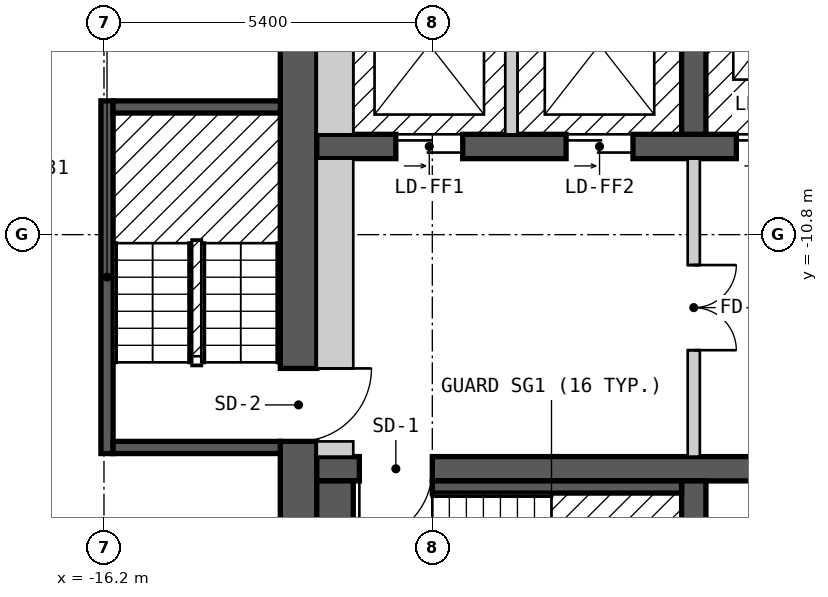
"""IFC4 building model, lengths in metres.
Left out: names, types, materials, properties, quantities, classifications, styles, units other than length and angle.
Written with IfcOpenShell. Run it as: python <this file> out.ifc"""

import sys

from ifc_helpers import new_model, si_unit, direction, frame, frame_2d, origin, origin_2d, place, context, subcontext, project, spatial, polyline, rectangle, outline, extrude, element, fill, save


model = new_model("IFC4")
c1 = context("Model", 3, precision=1e-05, world=origin(), true_north=direction((0.0, 1.0)))
c2 = subcontext(c1, "Body", "Model", "MODEL_VIEW")
j1 = project(units=[si_unit("LENGTHUNIT", "METRE"), si_unit("PLANEANGLEUNIT", "RADIAN")], contexts=[c1])
p1 = place(None, origin())
s1 = spatial("IfcSite", under=j1, at=p1, CompositionType="ELEMENT")
p2 = place(p1, origin())
s2 = spatial("IfcBuilding", under=s1, at=p2, CompositionType="ELEMENT")
p3 = place(p2, frame((0.0, 0.0, 187.2)))
s3 = spatial("IfcBuildingStorey", under=s2, at=p3, CompositionType="ELEMENT", Elevation=187.2)
p4 = place(p3, frame((-17.53, -15.736, 0.0), z_axis=(0.0, 0.0, 1.0), x_axis=(0.5, -0.866025403784, 0.0)))
e1 = element("IfcColumn", 1, at=p4, inside=s3, PredefinedType="COLUMN", context=c2, shape_type="SweptSolid", body=[
    extrude(rectangle(XDim=0.8, YDim=0.8, at=origin_2d()), origin(), (0.0, 0.0, 1.0), 3.0),
])
p5 = place(p3, frame((-13.0, -18.4, 0.0), z_axis=(0.0, 0.0, 1.0), x_axis=(0.0, 1.0, 0.0)))
e2 = element("IfcWall", 2, at=p5, inside=s3, PredefinedType="SHEAR", context=c2, shape_type="SweptSolid", body=[
    extrude(rectangle(XDim=12.8, YDim=0.6, at=frame_2d((6.4, 0.0))), origin(), (0.0, 0.0, 1.0), 2.7),
])
p6 = place(p5, frame((4.2, 0.0, 0.0)))
e3 = element("IfcOpeningElement", 3, at=p6, cuts=e2, PredefinedType="OPENING", context=c2, shape_type="SweptSolid", body=[
    extrude(rectangle(XDim=1.2, YDim=2.1, at=frame_2d((0.6, 1.05))), frame((0.0, 0.31, 0.0), z_axis=(0.0, -1.0, 0.0), x_axis=(1.0, 0.0, 0.0)), (0.0, 0.0, 1.0), 0.62),
])
p7 = place(p3, frame((-12.7, -14.65, 0.0), z_axis=(0.0, 0.0, 1.0), x_axis=(1.0, 0.0, 0.0)))
e4 = element("IfcWall", 4, at=p7, inside=s3, PredefinedType="SHEAR", context=c2, shape_type="SweptSolid", body=[
    extrude(rectangle(XDim=25.4, YDim=0.4, at=frame_2d((12.7, 0.0))), origin(), (0.0, 0.0, 1.0), 2.7),
])
p8 = place(p7, frame((1.9, 0.0, 0.0), z_axis=(0.0, 0.0, 1.0), x_axis=(-1.0, 0.0, 0.0)))
e5 = element("IfcOpeningElement", 5, at=p8, cuts=e4, PredefinedType="OPENING", context=c2, shape_type="SweptSolid", body=[
    extrude(rectangle(XDim=1.2, YDim=2.1, at=frame_2d((0.6, 1.05))), frame((0.0, 0.21, 0.0), z_axis=(0.0, -1.0, 0.0), x_axis=(1.0, 0.0, 0.0)), (0.0, 0.0, 1.0), 0.42),
])
p9 = place(p7, frame((24.75, 0.0, 0.0), z_axis=(0.0, 0.0, 1.0), x_axis=(-1.0, 0.0, 0.0)))
e6 = element("IfcOpeningElement", 6, at=p9, cuts=e4, PredefinedType="OPENING", context=c2, shape_type="SweptSolid", body=[
    extrude(rectangle(XDim=1.2, YDim=2.1, at=frame_2d((0.6, 1.05))), frame((0.0, 0.21, 0.0), z_axis=(0.0, -1.0, 0.0), x_axis=(1.0, 0.0, 0.0)), (0.0, 0.0, 1.0), 0.42),
])
p10 = place(p7, frame((8.6, 0.0, 0.0), z_axis=(0.0, 0.0, 1.0), x_axis=(-1.0, 0.0, 0.0)))
e7 = element("IfcOpeningElement", 7, at=p10, cuts=e4, PredefinedType="OPENING", context=c2, shape_type="SweptSolid", body=[
    extrude(rectangle(XDim=1.0, YDim=2.1, at=frame_2d((0.5, 1.05))), frame((0.0, 0.21, 0.0), z_axis=(0.0, -1.0, 0.0), x_axis=(1.0, 0.0, 0.0)), (0.0, 0.0, 1.0), 0.42),
])
p11 = place(p7, frame((11.35, 0.0, 0.0), z_axis=(0.0, 0.0, 1.0), x_axis=(-1.0, 0.0, 0.0)))
e8 = element("IfcOpeningElement", 8, at=p11, cuts=e4, PredefinedType="OPENING", context=c2, shape_type="SweptSolid", body=[
    extrude(rectangle(XDim=0.9, YDim=2.1, at=frame_2d((0.45, 1.05))), frame((0.0, 0.21, 0.0), z_axis=(0.0, -1.0, 0.0), x_axis=(1.0, 0.0, 0.0)), (0.0, 0.0, 1.0), 0.42),
])
p12 = place(p7, frame((14.15, 0.0, 0.0), z_axis=(0.0, 0.0, 1.0), x_axis=(-1.0, 0.0, 0.0)))
e9 = element("IfcOpeningElement", 9, at=p12, cuts=e4, PredefinedType="OPENING", context=c2, shape_type="SweptSolid", body=[
    extrude(rectangle(XDim=1.0, YDim=2.1, at=frame_2d((0.5, 1.05))), frame((0.0, 0.21, 0.0), z_axis=(0.0, -1.0, 0.0), x_axis=(1.0, 0.0, 0.0)), (0.0, 0.0, 1.0), 0.42),
])
p13 = place(p7, frame((17.75, 0.0, 0.0), z_axis=(0.0, 0.0, 1.0), x_axis=(-1.0, 0.0, 0.0)))
e10 = element("IfcOpeningElement", 10, at=p13, cuts=e4, PredefinedType="OPENING", context=c2, shape_type="SweptSolid", body=[
    extrude(rectangle(XDim=1.0, YDim=2.1, at=frame_2d((0.5, 1.05))), frame((0.0, 0.21, 0.0), z_axis=(0.0, -1.0, 0.0), x_axis=(1.0, 0.0, 0.0)), (0.0, 0.0, 1.0), 0.42),
])
p14 = place(p3, frame((-12.7, -9.35, 0.0), z_axis=(0.0, 0.0, 1.0), x_axis=(1.0, 0.0, 0.0)))
e11 = element("IfcWall", 11, at=p14, inside=s3, PredefinedType="SHEAR", context=c2, shape_type="SweptSolid", body=[
    extrude(rectangle(XDim=22.9, YDim=0.4, at=frame_2d((11.45, 0.0))), origin(), (0.0, 0.0, 1.0), 2.7),
])
p15 = place(p14, frame((1.3, 0.0, 0.0)))
e12 = element("IfcOpeningElement", 12, at=p15, cuts=e11, PredefinedType="OPENING", context=c2, shape_type="SweptSolid", body=[
    extrude(rectangle(XDim=1.1, YDim=2.1, at=frame_2d((0.55, 1.05))), frame((0.0, 0.21, 0.0), z_axis=(0.0, -1.0, 0.0), x_axis=(1.0, 0.0, 0.0)), (0.0, 0.0, 1.0), 0.42),
])
p16 = place(p14, frame((4.1, 0.0, 0.0)))
e13 = element("IfcOpeningElement", 13, at=p16, cuts=e11, PredefinedType="OPENING", context=c2, shape_type="SweptSolid", body=[
    extrude(rectangle(XDim=1.1, YDim=2.1, at=frame_2d((0.55, 1.05))), frame((0.0, 0.21, 0.0), z_axis=(0.0, -1.0, 0.0), x_axis=(1.0, 0.0, 0.0)), (0.0, 0.0, 1.0), 0.42),
])
p17 = place(p14, frame((6.9, 0.0, 0.0)))
e14 = element("IfcOpeningElement", 14, at=p17, cuts=e11, PredefinedType="OPENING", context=c2, shape_type="SweptSolid", body=[
    extrude(rectangle(XDim=1.1, YDim=2.1, at=frame_2d((0.55, 1.05))), frame((0.0, 0.21, 0.0), z_axis=(0.0, -1.0, 0.0), x_axis=(1.0, 0.0, 0.0)), (0.0, 0.0, 1.0), 0.42),
])
p18 = place(p14, frame((9.2, 0.0, 0.0)))
e15 = element("IfcOpeningElement", 15, at=p18, cuts=e11, PredefinedType="OPENING", context=c2, shape_type="SweptSolid", body=[
    extrude(rectangle(XDim=1.1, YDim=2.1, at=frame_2d((0.55, 1.05))), frame((0.0, 0.21, 0.0), z_axis=(0.0, -1.0, 0.0), x_axis=(1.0, 0.0, 0.0)), (0.0, 0.0, 1.0), 0.42),
])
p19 = place(p14, frame((11.5, 0.0, 0.0)))
e16 = element("IfcOpeningElement", 16, at=p19, cuts=e11, PredefinedType="OPENING", context=c2, shape_type="SweptSolid", body=[
    extrude(rectangle(XDim=1.1, YDim=2.1, at=frame_2d((0.55, 1.05))), frame((0.0, 0.21, 0.0), z_axis=(0.0, -1.0, 0.0), x_axis=(1.0, 0.0, 0.0)), (0.0, 0.0, 1.0), 0.42),
])
p20 = place(p14, frame((13.8, 0.0, 0.0)))
e17 = element("IfcOpeningElement", 17, at=p20, cuts=e11, PredefinedType="OPENING", context=c2, shape_type="SweptSolid", body=[
    extrude(rectangle(XDim=1.1, YDim=2.1, at=frame_2d((0.55, 1.05))), frame((0.0, 0.21, 0.0), z_axis=(0.0, -1.0, 0.0), x_axis=(1.0, 0.0, 0.0)), (0.0, 0.0, 1.0), 0.42),
])
p21 = place(p14, frame((16.1, 0.0, 0.0)))
e18 = element("IfcOpeningElement", 18, at=p21, cuts=e11, PredefinedType="OPENING", context=c2, shape_type="SweptSolid", body=[
    extrude(rectangle(XDim=1.1, YDim=2.1, at=frame_2d((0.55, 1.05))), frame((0.0, 0.21, 0.0), z_axis=(0.0, -1.0, 0.0), x_axis=(1.0, 0.0, 0.0)), (0.0, 0.0, 1.0), 0.42),
])
p22 = place(p14, frame((18.4, 0.0, 0.0)))
e19 = element("IfcOpeningElement", 19, at=p22, cuts=e11, PredefinedType="OPENING", context=c2, shape_type="SweptSolid", body=[
    extrude(rectangle(XDim=1.1, YDim=2.1, at=frame_2d((0.55, 1.05))), frame((0.0, 0.21, 0.0), z_axis=(0.0, -1.0, 0.0), x_axis=(1.0, 0.0, 0.0)), (0.0, 0.0, 1.0), 0.42),
])
p23 = place(p14, frame((20.8, 0.0, 0.0)))
e20 = element("IfcOpeningElement", 20, at=p23, cuts=e11, PredefinedType="OPENING", context=c2, shape_type="SweptSolid", body=[
    extrude(rectangle(XDim=1.1, YDim=2.1, at=frame_2d((0.55, 1.05))), frame((0.0, 0.21, 0.0), z_axis=(0.0, -1.0, 0.0), x_axis=(1.0, 0.0, 0.0)), (0.0, 0.0, 1.0), 0.42),
])
for number, where, z_axis, x_axis in (
    (21, (-6.5, -18.4, 0.0), (0.0, 0.0, 1.0), (0.0, 1.0, 0.0)),
    (22, (-6.5, -9.15, 0.0), (0.0, 0.0, 1.0), (0.0, 1.0, 0.0)),
):
    element("IfcWall", number, at=place(p3, frame(where, z_axis=z_axis, x_axis=x_axis)), inside=s3, PredefinedType="SHEAR", context=c2, shape_type="SweptSolid", body=[
        extrude(rectangle(XDim=3.55, YDim=0.4, at=frame_2d((1.775, 0.0))), origin(), (0.0, 0.0, 1.0), 2.7),
    ])
p24 = place(p3, frame((-26.024, -3.025, 0.0), z_axis=(0.0, 0.0, 1.0), x_axis=(0.500018670445, -0.86601462413, 0.0)))
e23 = element("IfcWall", 23, at=p24, inside=s3, PredefinedType="SOLIDWALL", context=c2, shape_type="SweptSolid", body=[
    extrude(outline(polyline([(0.0, -0.15), (20.785, -0.15), (20.705, 0.15), (0.08, 0.15), (0.0, -0.15)])), origin(), (0.0, 0.0, 1.0), 2.7),
])
p25 = place(p24, frame((2.346, 0.0, 0.15)))
e24 = element("IfcOpeningElement", 24, at=p25, cuts=e23, PredefinedType="OPENING", context=c2, shape_type="SweptSolid", body=[
    extrude(rectangle(XDim=1.5, YDim=2.1, at=frame_2d((0.75, 1.05))), frame((0.0, 0.16, 0.0), z_axis=(0.0, -1.0, 0.0), x_axis=(1.0, 0.0, 0.0)), (0.0, 0.0, 1.0), 0.32),
])
p26 = place(p24, frame((7.21, 0.0, 0.15)))
e25 = element("IfcOpeningElement", 25, at=p26, cuts=e23, PredefinedType="OPENING", context=c2, shape_type="SweptSolid", body=[
    extrude(rectangle(XDim=1.5, YDim=2.1, at=frame_2d((0.75, 1.05))), frame((0.0, 0.16, 0.0), z_axis=(0.0, -1.0, 0.0), x_axis=(1.0, 0.0, 0.0)), (0.0, 0.0, 1.0), 0.32),
])
p27 = place(p24, frame((12.073, 0.0, 0.15)))
e26 = element("IfcOpeningElement", 26, at=p27, cuts=e23, PredefinedType="OPENING", context=c2, shape_type="SweptSolid", body=[
    extrude(rectangle(XDim=1.5, YDim=2.1, at=frame_2d((0.75, 1.05))), frame((0.0, 0.16, 0.0), z_axis=(0.0, -1.0, 0.0), x_axis=(1.0, 0.0, 0.0)), (0.0, 0.0, 1.0), 0.32),
])
p28 = place(p24, frame((16.938, 0.0, 0.15)))
e27 = element("IfcOpeningElement", 27, at=p28, cuts=e23, PredefinedType="OPENING", context=c2, shape_type="SweptSolid", body=[
    extrude(rectangle(XDim=1.5, YDim=2.1, at=frame_2d((0.75, 1.05))), frame((0.0, 0.16, 0.0), z_axis=(0.0, -1.0, 0.0), x_axis=(1.0, 0.0, 0.0)), (0.0, 0.0, 1.0), 0.32),
])
p29 = place(p3, frame((-23.13, -7.737, 0.0), z_axis=(0.0, 0.0, 1.0), x_axis=(0.86598451299, 0.500070818246, 0.0)))
e28 = element("IfcWall", 28, at=p29, inside=s3, PredefinedType="PARTITIONING", context=c2, shape_type="SweptSolid", body=[
    extrude(rectangle(XDim=8.695, YDim=0.2, at=frame_2d((4.348, 0.0))), origin(), (0.0, 0.0, 1.0), 2.7),
])
p30 = place(p3, frame((-16.15, -14.4, 0.0), z_axis=(0.0, 0.0, 1.0), x_axis=(0.0, 1.0, 0.0)))
e29 = element("IfcWall", 29, at=p30, inside=s3, PredefinedType="SOLIDWALL", context=c2, shape_type="SweptSolid", body=[
    extrude(rectangle(XDim=5.8, YDim=0.2, at=frame_2d((2.9, 0.0))), origin(), (0.0, 0.0, 1.0), 2.7),
])
for number, where, z_axis, x_axis in (
    (30, (-16.05, -14.3, 0.0), (0.0, 0.0, 1.0), (1.0, 0.0, 0.0)),
    (31, (-16.05, -8.7, 0.0), (0.0, 0.0, 1.0), (1.0, 0.0, 0.0)),
):
    element("IfcWall", number, at=place(p3, frame(where, z_axis=z_axis, x_axis=x_axis)), inside=s3, PredefinedType="SOLIDWALL", context=c2, shape_type="SweptSolid", body=[
        extrude(rectangle(XDim=2.75, YDim=0.2, at=frame_2d((1.375, 0.0))), origin(), (0.0, 0.0, 1.0), 2.7),
    ])
p31 = place(p3, frame((-12.4, -18.4, 0.0), z_axis=(0.0, 0.0, 1.0), x_axis=(0.0, 1.0, 0.0)))
e32 = element("IfcWall", 32, at=p31, inside=s3, PredefinedType="SOLIDWALL", context=c2, shape_type="SweptSolid", body=[
    extrude(rectangle(XDim=3.55, YDim=0.6, at=frame_2d((1.775, 0.0))), origin(), (0.0, 0.0, 1.0), 2.7),
])
p32 = place(p3, frame((-12.7, -14.325, 0.0), z_axis=(0.0, 0.0, 1.0), x_axis=(1.0, 0.0, 0.0)))
e33 = element("IfcWall", 33, at=p32, inside=s3, PredefinedType="PARTITIONING", context=c2, shape_type="SweptSolid", body=[
    extrude(rectangle(XDim=0.6, YDim=0.25, at=frame_2d((0.3, 0.0))), origin(), (0.0, 0.0, 1.0), 2.7),
])
p33 = place(p3, frame((-12.4, -13.0, 0.0), z_axis=(0.0, 0.0, 1.0), x_axis=(0.0, 1.0, 0.0)))
e34 = element("IfcWall", 34, at=p33, inside=s3, PredefinedType="PARTITIONING", context=c2, shape_type="SweptSolid", body=[
    extrude(rectangle(XDim=3.45, YDim=0.6, at=frame_2d((1.725, 0.0))), origin(), (0.0, 0.0, 1.0), 2.7),
])
p34 = place(p3, frame((-12.4, -9.15, 0.0), z_axis=(0.0, 0.0, 1.0), x_axis=(0.0, 1.0, 0.0)))
e35 = element("IfcWall", 35, at=p34, inside=s3, PredefinedType="SOLIDWALL", context=c2, shape_type="SweptSolid", body=[
    extrude(rectangle(XDim=3.55, YDim=0.6, at=frame_2d((1.775, 0.0))), origin(), (0.0, 0.0, 1.0), 2.7),
])
p35 = place(p3, frame((-10.8, -14.95, 0.0), z_axis=(0.0, 0.0, 1.0), x_axis=(1.0, 0.0, 0.0)))
e36 = element("IfcWall", 36, at=p35, inside=s3, PredefinedType="SOLIDWALL", context=c2, shape_type="SweptSolid", body=[
    extrude(rectangle(XDim=4.1, YDim=0.2, at=frame_2d((2.05, 0.0))), origin(), (0.0, 0.0, 1.0), 2.7),
])
p36 = place(p3, frame((-9.5, -9.15, 0.0), z_axis=(0.0, 0.0, 1.0), x_axis=(0.0, 1.0, 0.0)))
e37 = element("IfcWall", 37, at=p36, inside=s3, PredefinedType="SOLIDWALL", context=c2, shape_type="SweptSolid", body=[
    extrude(rectangle(XDim=2.95, YDim=0.2, at=frame_2d((1.475, 0.0))), origin(), (0.0, 0.0, 1.0), 2.7),
])
p37 = place(p3, frame((-6.5, -14.45, 0.0), z_axis=(0.0, 0.0, 1.0), x_axis=(0.0, 1.0, 0.0)))
e38 = element("IfcWall", 38, at=p37, inside=s3, PredefinedType="PARTITIONING", context=c2, shape_type="SweptSolid", body=[
    extrude(rectangle(XDim=4.9, YDim=0.2, at=frame_2d((2.45, 0.0))), origin(), (0.0, 0.0, 1.0), 2.7),
])
p38 = place(p37, frame((3.15, 0.0, 0.0), z_axis=(0.0, 0.0, 1.0), x_axis=(-1.0, 0.0, 0.0)))
e39 = element("IfcOpeningElement", 39, at=p38, cuts=e38, PredefinedType="OPENING", context=c2, shape_type="SweptSolid", body=[
    extrude(rectangle(XDim=1.4, YDim=2.1, at=frame_2d((0.7, 1.05))), frame((0.0, 0.11, 0.0), z_axis=(0.0, -1.0, 0.0), x_axis=(1.0, 0.0, 0.0)), (0.0, 0.0, 1.0), 0.22),
])
p39 = place(p15, origin())
e40 = element("IfcDoor", 40, at=p39, inside=s3, OperationType="DOUBLE_DOOR_SLIDING", PredefinedType="DOOR", context=c2, shape_type="SweptSolid", body=[
    extrude(rectangle(XDim=1.1, YDim=2.1, at=frame_2d((0.55, 1.05))), frame((0.0, 0.025, 0.0), z_axis=(0.0, -1.0, 0.0), x_axis=(1.0, 0.0, 0.0)), (0.0, 0.0, 1.0), 0.05),
])
fill(e12, e40)
p40 = place(p16, origin())
e41 = element("IfcDoor", 41, at=p40, inside=s3, OperationType="DOUBLE_DOOR_SLIDING", PredefinedType="DOOR", context=c2, shape_type="SweptSolid", body=[
    extrude(rectangle(XDim=1.1, YDim=2.1, at=frame_2d((0.55, 1.05))), frame((0.0, 0.025, 0.0), z_axis=(0.0, -1.0, 0.0), x_axis=(1.0, 0.0, 0.0)), (0.0, 0.0, 1.0), 0.05),
])
fill(e13, e41)
p41 = place(p17, origin())
e42 = element("IfcDoor", 42, at=p41, inside=s3, OperationType="DOUBLE_DOOR_SLIDING", PredefinedType="DOOR", context=c2, shape_type="SweptSolid", body=[
    extrude(rectangle(XDim=1.1, YDim=2.1, at=frame_2d((0.55, 1.05))), frame((0.0, 0.025, 0.0), z_axis=(0.0, -1.0, 0.0), x_axis=(1.0, 0.0, 0.0)), (0.0, 0.0, 1.0), 0.05),
])
fill(e14, e42)
p42 = place(p8, origin())
e43 = element("IfcDoor", 43, at=p42, inside=s3, OperationType="SINGLE_SWING_RIGHT", PredefinedType="DOOR", context=c2, shape_type="SweptSolid", body=[
    extrude(rectangle(XDim=1.2, YDim=2.1, at=frame_2d((0.6, 1.05))), frame((0.0, 0.025, 0.0), z_axis=(0.0, -1.0, 0.0), x_axis=(1.0, 0.0, 0.0)), (0.0, 0.0, 1.0), 0.05),
])
fill(e5, e43)
p43 = place(p6, origin())
e44 = element("IfcDoor", 44, at=p43, inside=s3, OperationType="SINGLE_SWING_RIGHT", PredefinedType="DOOR", context=c2, shape_type="SweptSolid", body=[
    extrude(rectangle(XDim=1.2, YDim=2.1, at=frame_2d((0.6, 1.05))), frame((0.0, 0.025, 0.0), z_axis=(0.0, -1.0, 0.0), x_axis=(1.0, 0.0, 0.0)), (0.0, 0.0, 1.0), 0.05),
])
fill(e3, e44)
p44 = place(p38, origin())
e45 = element("IfcDoor", 45, at=p44, inside=s3, OperationType="DOUBLE_DOOR_SINGLE_SWING", PredefinedType="DOOR", context=c2, shape_type="SweptSolid", body=[
    extrude(rectangle(XDim=1.4, YDim=2.1, at=frame_2d((0.7, 1.05))), frame((0.0, 0.025, 0.0), z_axis=(0.0, -1.0, 0.0), x_axis=(1.0, 0.0, 0.0)), (0.0, 0.0, 1.0), 0.05),
])
fill(e39, e45)
save(model, sys.argv[1])
